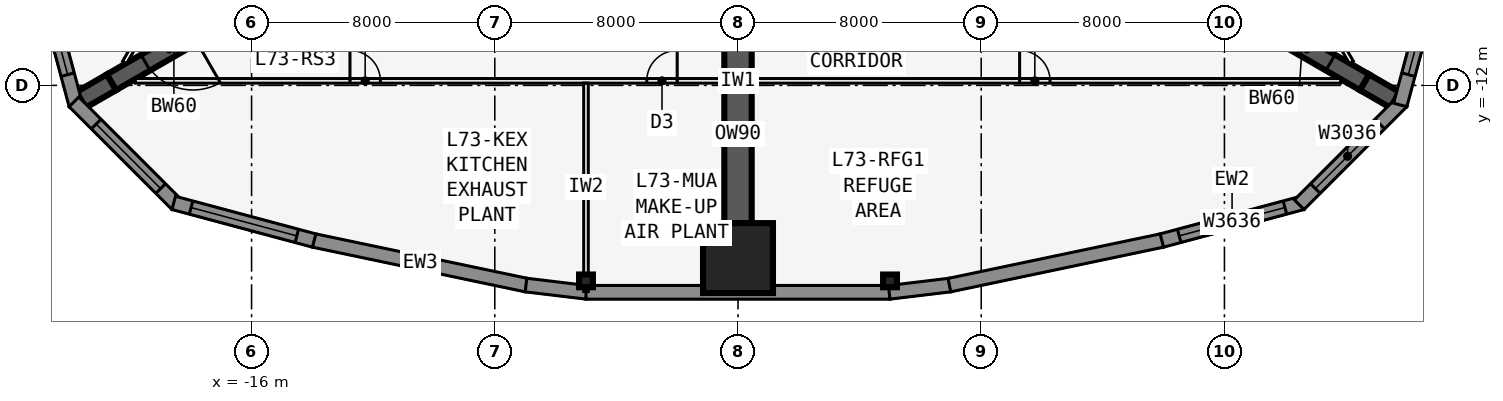
"""IFC4 building model, lengths in metres.
Left out: names, types, materials, properties, quantities, classifications, styles, units other than length and angle.
Written with IfcOpenShell. Run it as: python <this file> out.ifc"""

import sys

from ifc_helpers import new_model, si_unit, direction, frame, frame_2d, origin, origin_2d, place, context, subcontext, project, spatial, polyline, rectangle, i_section, outline, extrude, element, fill, save


model = new_model("IFC4")
c1 = context("Model", 3, precision=1e-05, world=origin(), true_north=direction((0.0, 1.0)))
c2 = subcontext(c1, "Body", "Model", "MODEL_VIEW")
j1 = project(units=[si_unit("LENGTHUNIT", "METRE"), si_unit("PLANEANGLEUNIT", "RADIAN")], contexts=[c1])
p1 = place(None, origin())
s1 = spatial("IfcSite", under=j1, at=p1, CompositionType="ELEMENT")
p2 = place(p1, origin())
s2 = spatial("IfcBuilding", under=s1, at=p2, CompositionType="ELEMENT")
p3 = place(p2, frame((0.0, 0.0, 275.3)))
s3 = spatial("IfcBuildingStorey", under=s2, at=p3, CompositionType="ELEMENT", Elevation=275.3)
p4 = place(p3, frame((16.5, -9.526, 0.0), z_axis=(0.0, 0.0, 1.0), x_axis=(0.866031398331, -0.499989616998, 0.0)))
e1 = element("IfcWall", 1, at=p4, inside=s3, PredefinedType="SHEAR", context=c2, shape_type="SweptSolid", body=[
    extrude(rectangle(XDim=4.746, YDim=0.6, at=frame_2d((2.373, 0.0))), origin(), (0.0, 0.0, 1.0), 6.0),
])
p5 = place(p4, frame((1.65, 0.0, 0.0)))
e2 = element("IfcOpeningElement", 2, at=p5, cuts=e1, PredefinedType="OPENING", context=c2, shape_type="SweptSolid", body=[
    extrude(rectangle(XDim=1.8, YDim=2.13, at=frame_2d((0.9, 1.065))), frame((0.0, 0.31, 0.0), z_axis=(0.0, -1.0, 0.0), x_axis=(1.0, 0.0, 0.0)), (0.0, 0.0, 1.0), 0.62),
])
p6 = place(p3, frame((20.61, -11.899, 0.0), z_axis=(0.0, 0.0, 1.0), x_axis=(0.866009537788, -0.500027479704, 0.0)))
e3 = element("IfcWall", 3, at=p6, inside=s3, PredefinedType="SHEAR", context=c2, shape_type="SweptSolid", body=[
    extrude(rectangle(XDim=1.155, YDim=0.6, at=frame_2d((0.577, 0.0))), origin(), (0.0, 0.0, 1.0), 6.0),
])
p7 = place(p3, frame((-16.5, -9.526, 0.0), z_axis=(0.0, 0.0, 1.0), x_axis=(-0.866031398331, -0.499989616998, 0.0)))
e4 = element("IfcWall", 4, at=p7, inside=s3, PredefinedType="SHEAR", context=c2, shape_type="SweptSolid", body=[
    extrude(rectangle(XDim=4.746, YDim=0.6, at=frame_2d((2.373, 0.0))), origin(), (0.0, 0.0, 1.0), 6.0),
])
p8 = place(p7, frame((1.65, 0.0, 0.0)))
e5 = element("IfcOpeningElement", 5, at=p8, cuts=e4, PredefinedType="OPENING", context=c2, shape_type="SweptSolid", body=[
    extrude(rectangle(XDim=1.8, YDim=2.13, at=frame_2d((0.9, 1.065))), frame((0.0, 0.31, 0.0), z_axis=(0.0, -1.0, 0.0), x_axis=(1.0, 0.0, 0.0)), (0.0, 0.0, 1.0), 0.62),
])
p9 = place(p3, frame((-20.61, -11.899, 0.0), z_axis=(0.0, 0.0, 1.0), x_axis=(-0.866009537788, -0.500027479704, 0.0)))
e6 = element("IfcWall", 6, at=p9, inside=s3, PredefinedType="SHEAR", context=c2, shape_type="SweptSolid", body=[
    extrude(rectangle(XDim=1.155, YDim=0.6, at=frame_2d((0.577, 0.0))), origin(), (0.0, 0.0, 1.0), 6.0),
])
p10 = place(p3, frame((0.0, -9.526, 0.0), z_axis=(0.0, 0.0, 1.0), x_axis=(0.0, -1.0, 0.0)))
e7 = element("IfcWall", 7, at=p10, inside=s3, PredefinedType="SHEAR", context=c2, shape_type="SweptSolid", body=[
    extrude(rectangle(XDim=8.154, YDim=0.9, at=frame_2d((4.077, 0.0))), origin(), (0.0, 0.0, 1.0), 6.0),
])
for number, where, z_axis, x_axis in (
    (8, (-5.0, -18.43, 0.0), (0.0, 0.0, 1.0), (0.0, -1.0, 0.0)),
    (9, (5.0, -18.43, 0.0), (0.0, 0.0, 1.0), (0.0, -1.0, 0.0)),
):
    element("IfcColumn", number, at=place(p3, frame(where, z_axis=z_axis, x_axis=x_axis)), inside=s3, PredefinedType="COLUMN", context=c2, shape_type="SweptSolid", body=[
        extrude(i_section(OverallWidth=0.419, OverallDepth=0.455, WebThickness=0.042, FlangeThickness=0.068, at=origin_2d()), origin(), (0.0, 0.0, 1.0), 6.0),
    ])
p11 = place(p3, frame((0.0, -17.68, 0.0), z_axis=(0.0, 0.0, 1.0), x_axis=(0.0, -1.0, 0.0)))
e10 = element("IfcColumn", 10, at=p11, inside=s3, PredefinedType="COLUMN", context=c2, shape_type="SweptSolid", body=[
    extrude(rectangle(XDim=2.3, YDim=2.3, at=origin_2d()), origin(), (0.0, 0.0, 1.0), 6.0),
])
p12 = place(p3, frame((-13.954, -17.1, 0.0), z_axis=(0.0, 0.0, 1.0), x_axis=(0.978654320409, -0.205513311355, 0.0)))
e11 = element("IfcWall", 11, at=p12, inside=s3, PredefinedType="SOLIDWALL", context=c2, shape_type="SweptSolid", body=[
    extrude(outline(polyline([(0.0, 0.0), (7.153, 0.0), (7.153, 5.75), (0.0, 5.75), (0.0, 0.0)]), holes=[polyline([(5.826, 2.875), (5.75, 3.457), (5.525, 4.0), (5.167, 4.466), (4.701, 4.823), (4.159, 5.048), (3.576, 5.125), (2.994, 5.048), (2.451, 4.823), (1.985, 4.466), (1.628, 4.0), (1.403, 3.457), (1.326, 2.875), (1.403, 2.293), (1.628, 1.75), (1.985, 1.284), (2.451, 0.926), (2.994, 0.702), (3.576, 0.625), (4.159, 0.702), (4.701, 0.926), (5.167, 1.284), (5.525, 1.75), (5.75, 2.293), (5.826, 2.875)])]), frame((0.0, 0.225, 0.0), z_axis=(0.0, -1.0, 0.0), x_axis=(1.0, 0.0, 0.0)), (0.0, 0.0, 1.0), 0.45),
])
p13 = place(p3, frame((-6.973, -18.567, 0.0), z_axis=(0.0, 0.0, 1.0), x_axis=(0.992877411981, -0.119140441403, 0.0)))
e12 = element("IfcWall", 12, at=p13, inside=s3, PredefinedType="SOLIDWALL", context=c2, shape_type="SweptSolid", body=[
    extrude(rectangle(XDim=2.014, YDim=0.45, at=frame_2d((1.007, 0.0))), origin(), (0.0, 0.0, 1.0), 5.75),
])
p14 = place(p3, frame((-5.0, -18.805, 0.0), z_axis=(0.0, 0.0, 1.0), x_axis=(1.0, 0.0, 0.0)))
e13 = element("IfcWall", 13, at=p14, inside=s3, PredefinedType="SOLIDWALL", context=c2, shape_type="SweptSolid", body=[
    extrude(outline(polyline([(0.0, 0.0), (10.0, 0.0), (10.0, 5.75), (0.0, 5.75), (0.0, 0.0)]), holes=[polyline([(7.25, 2.875), (7.173, 3.457), (6.948, 4.0), (6.591, 4.466), (6.125, 4.823), (5.582, 5.048), (5.0, 5.125), (4.418, 5.048), (3.875, 4.823), (3.409, 4.466), (3.052, 4.0), (2.827, 3.457), (2.75, 2.875), (2.827, 2.293), (3.052, 1.75), (3.409, 1.284), (3.875, 0.926), (4.418, 0.702), (5.0, 0.625), (5.582, 0.702), (6.125, 0.926), (6.591, 1.284), (6.948, 1.75), (7.173, 2.293), (7.25, 2.875)])]), frame((0.0, 0.225, 0.0), z_axis=(0.0, -1.0, 0.0), x_axis=(1.0, 0.0, 0.0)), (0.0, 0.0, 1.0), 0.45),
])
p15 = place(p3, frame((4.973, -18.807, 0.0), z_axis=(0.0, 0.0, 1.0), x_axis=(0.992877411981, 0.119140441403, 0.0)))
e14 = element("IfcWall", 14, at=p15, inside=s3, PredefinedType="SOLIDWALL", context=c2, shape_type="SweptSolid", body=[
    extrude(rectangle(XDim=2.014, YDim=0.45, at=frame_2d((1.007, 0.0))), origin(), (0.0, 0.0, 1.0), 5.75),
])
p16 = place(p3, frame((6.954, -18.57, 0.0), z_axis=(0.0, 0.0, 1.0), x_axis=(0.978654320409, 0.205513311355, 0.0)))
e15 = element("IfcWall", 15, at=p16, inside=s3, PredefinedType="SOLIDWALL", context=c2, shape_type="SweptSolid", body=[
    extrude(outline(polyline([(0.0, 0.0), (7.153, 0.0), (7.153, 5.75), (0.0, 5.75), (0.0, 0.0)]), holes=[polyline([(5.826, 2.875), (5.75, 3.457), (5.525, 4.0), (5.167, 4.466), (4.701, 4.823), (4.159, 5.048), (3.576, 5.125), (2.994, 5.048), (2.451, 4.823), (1.985, 4.466), (1.628, 4.0), (1.403, 3.457), (1.326, 2.875), (1.403, 2.293), (1.628, 1.75), (1.985, 1.284), (2.451, 0.926), (2.994, 0.702), (3.576, 0.625), (4.159, 0.702), (4.701, 0.926), (5.167, 1.284), (5.525, 1.75), (5.75, 2.293), (5.826, 2.875)])]), frame((0.0, 0.225, 0.0), z_axis=(0.0, -1.0, 0.0), x_axis=(1.0, 0.0, 0.0)), (0.0, 0.0, 1.0), 0.45),
])
p17 = place(p3, frame((13.942, -17.103, 0.0), z_axis=(0.0, 0.0, 1.0), x_axis=(0.965913862671, 0.258863689806, 0.0)))
e16 = element("IfcWall", 16, at=p17, inside=s3, PredefinedType="SOLIDWALL", context=c2, shape_type="SweptSolid", body=[
    extrude(rectangle(XDim=4.782, YDim=0.45, at=frame_2d((2.391, 0.0))), origin(), (0.0, 0.0, 1.0), 5.75),
])
p18 = place(p17, frame((0.591, 0.0, 0.9)))
e17 = element("IfcOpeningElement", 17, at=p18, cuts=e16, PredefinedType="OPENING", context=c2, shape_type="SweptSolid", body=[
    extrude(rectangle(XDim=3.6, YDim=3.6, at=frame_2d((1.8, 1.8))), frame((0.0, 0.235, 0.0), z_axis=(0.0, -1.0, 0.0), x_axis=(1.0, 0.0, 0.0)), (0.0, 0.0, 1.0), 0.47),
])
p19 = place(p3, frame((18.46, -15.924, 0.0), z_axis=(0.0, 0.0, 1.0), x_axis=(0.707081252484, 0.707132308968, 0.0)))
e18 = element("IfcWall", 18, at=p19, inside=s3, PredefinedType="SOLIDWALL", context=c2, shape_type="SweptSolid", body=[
    extrude(outline(polyline([(4.782, 0.225), (4.723, 0.225), (4.375, 0.132), (4.351, 0.225), (0.0, 0.225), (0.0, -0.225), (4.782, -0.225), (4.782, 0.225)])), origin(), (0.0, 0.0, 1.0), 5.75),
])
p20 = place(p19, frame((0.75, 0.0, 0.9)))
e19 = element("IfcOpeningElement", 19, at=p20, cuts=e18, PredefinedType="OPENING", context=c2, shape_type="SweptSolid", body=[
    extrude(rectangle(XDim=3.0, YDim=3.6, at=frame_2d((1.5, 1.8))), frame((0.0, 0.235, 0.0), z_axis=(0.0, -1.0, 0.0), x_axis=(1.0, 0.0, 0.0)), (0.0, 0.0, 1.0), 0.47),
])
p21 = place(p3, frame((21.783, -12.644, 0.0), z_axis=(0.0, 0.0, 1.0), x_axis=(0.25880328844, 0.965930048136, 0.0)))
e20 = element("IfcWall", 20, at=p21, inside=s3, PredefinedType="SOLIDWALL", context=c2, shape_type="SweptSolid", body=[
    extrude(outline(polyline([(4.782, 0.225), (0.431, 0.225), (0.406, 0.132), (0.06, 0.225), (0.0, 0.225), (0.0, -0.225), (4.782, -0.225), (4.782, 0.225)])), origin(), (0.0, 0.0, 1.0), 5.75),
])
p22 = place(p21, frame((1.031, 0.0, 0.9)))
e21 = element("IfcOpeningElement", 21, at=p22, cuts=e20, PredefinedType="OPENING", context=c2, shape_type="SweptSolid", body=[
    extrude(rectangle(XDim=3.0, YDim=3.6, at=frame_2d((1.5, 1.8))), frame((0.0, 0.235, 0.0), z_axis=(0.0, -1.0, 0.0), x_axis=(1.0, 0.0, 0.0)), (0.0, 0.0, 1.0), 0.47),
])
p23 = place(p3, frame((-23.02, -8.025, 0.0), z_axis=(0.0, 0.0, 1.0), x_axis=(0.25880328844, -0.965930048136, 0.0)))
e22 = element("IfcWall", 22, at=p23, inside=s3, PredefinedType="SOLIDWALL", context=c2, shape_type="SweptSolid", body=[
    extrude(outline(polyline([(4.782, 0.225), (4.722, 0.225), (4.375, 0.132), (4.351, 0.225), (0.0, 0.225), (0.0, -0.225), (4.782, -0.225), (4.782, 0.225)])), origin(), (0.0, 0.0, 1.0), 5.75),
])
p24 = place(p23, frame((0.75, 0.0, 0.9)))
e23 = element("IfcOpeningElement", 23, at=p24, cuts=e22, PredefinedType="OPENING", context=c2, shape_type="SweptSolid", body=[
    extrude(rectangle(XDim=3.0, YDim=3.6, at=frame_2d((1.5, 1.8))), frame((0.0, 0.235, 0.0), z_axis=(0.0, -1.0, 0.0), x_axis=(1.0, 0.0, 0.0)), (0.0, 0.0, 1.0), 0.47),
])
p25 = place(p3, frame((-21.841, -12.542, 0.0), z_axis=(0.0, 0.0, 1.0), x_axis=(0.707081252484, -0.707132308968, 0.0)))
e24 = element("IfcWall", 24, at=p25, inside=s3, PredefinedType="SOLIDWALL", context=c2, shape_type="SweptSolid", body=[
    extrude(outline(polyline([(4.782, 0.225), (0.431, 0.225), (0.406, 0.132), (0.059, 0.225), (0.0, 0.225), (0.0, -0.225), (4.782, -0.225), (4.782, 0.225)])), origin(), (0.0, 0.0, 1.0), 5.75),
])
p26 = place(p25, frame((1.031, 0.0, 0.9)))
e25 = element("IfcOpeningElement", 25, at=p26, cuts=e24, PredefinedType="OPENING", context=c2, shape_type="SweptSolid", body=[
    extrude(rectangle(XDim=3.0, YDim=3.6, at=frame_2d((1.5, 1.8))), frame((0.0, 0.235, 0.0), z_axis=(0.0, -1.0, 0.0), x_axis=(1.0, 0.0, 0.0)), (0.0, 0.0, 1.0), 0.47),
])
p27 = place(p3, frame((-18.561, -15.865, 0.0), z_axis=(0.0, 0.0, 1.0), x_axis=(0.965913862671, -0.258863689806, 0.0)))
e26 = element("IfcWall", 26, at=p27, inside=s3, PredefinedType="SOLIDWALL", context=c2, shape_type="SweptSolid", body=[
    extrude(rectangle(XDim=4.782, YDim=0.45, at=frame_2d((2.391, 0.0))), origin(), (0.0, 0.0, 1.0), 5.75),
])
p28 = place(p27, frame((0.591, 0.0, 0.9)))
e27 = element("IfcOpeningElement", 27, at=p28, cuts=e26, PredefinedType="OPENING", context=c2, shape_type="SweptSolid", body=[
    extrude(rectangle(XDim=3.6, YDim=3.6, at=frame_2d((1.8, 1.8))), frame((0.0, 0.235, 0.0), z_axis=(0.0, -1.0, 0.0), x_axis=(1.0, 0.0, 0.0)), (0.0, 0.0, 1.0), 0.47),
])
p29 = place(p3, frame((-19.827, -11.851, 0.0), z_axis=(0.0, 0.0, 1.0), x_axis=(1.0, 0.0, 0.0)))
e28 = element("IfcWall", 28, at=p29, inside=s3, PredefinedType="PARTITIONING", context=c2, shape_type="SweptSolid", body=[
    extrude(rectangle(XDim=39.654, YDim=0.15, at=frame_2d((19.827, 0.0))), origin(), (0.0, 0.0, 1.0), 5.75),
])
p30 = place(p29, frame((7.063, 0.0, 0.0)))
e29 = element("IfcOpeningElement", 29, at=p30, cuts=e28, PredefinedType="OPENING", context=c2, shape_type="SweptSolid", body=[
    extrude(rectangle(XDim=1.0, YDim=2.13, at=frame_2d((0.5, 1.065))), frame((0.0, 0.085, 0.0), z_axis=(0.0, -1.0, 0.0), x_axis=(1.0, 0.0, 0.0)), (0.0, 0.0, 1.0), 0.17),
])
p31 = place(p29, frame((16.827, 0.0, 0.0)))
e30 = element("IfcOpeningElement", 30, at=p31, cuts=e28, PredefinedType="OPENING", context=c2, shape_type="SweptSolid", body=[
    extrude(rectangle(XDim=1.0, YDim=2.13, at=frame_2d((0.5, 1.065))), frame((0.0, 0.085, 0.0), z_axis=(0.0, -1.0, 0.0), x_axis=(1.0, 0.0, 0.0)), (0.0, 0.0, 1.0), 0.17),
])
p32 = place(p29, frame((29.091, 0.0, 0.0)))
e31 = element("IfcOpeningElement", 31, at=p32, cuts=e28, PredefinedType="OPENING", context=c2, shape_type="SweptSolid", body=[
    extrude(rectangle(XDim=1.0, YDim=2.13, at=frame_2d((0.5, 1.065))), frame((0.0, 0.085, 0.0), z_axis=(0.0, -1.0, 0.0), x_axis=(1.0, 0.0, 0.0)), (0.0, 0.0, 1.0), 0.17),
])
p33 = place(p3, frame((-5.0, -11.926, 0.0), z_axis=(0.0, 0.0, 1.0), x_axis=(0.0, -1.0, 0.0)))
e32 = element("IfcWall", 32, at=p33, inside=s3, PredefinedType="PARTITIONING", context=c2, shape_type="SweptSolid", body=[
    extrude(rectangle(XDim=6.853, YDim=0.15, at=frame_2d((3.426, 0.0))), origin(), (0.0, 0.0, 1.0), 4.35),
])
p34 = place(p3, frame((20.177, -11.245, 0.0), z_axis=(0.0, 0.0, 1.0), x_axis=(-0.499998875317, 0.866026053119, 0.0)))
e33 = element("IfcWall", 33, at=p34, inside=s3, PredefinedType="PARTITIONING", context=c2, shape_type="SweptSolid", body=[
    extrude(rectangle(XDim=39.654, YDim=0.15, at=frame_2d((19.827, 0.0))), origin(), (0.0, 0.0, 1.0), 5.75),
])
p35 = place(p34, frame((6.563, 0.0, 0.0)))
e34 = element("IfcOpeningElement", 34, at=p35, cuts=e33, PredefinedType="OPENING", context=c2, shape_type="SweptSolid", body=[
    extrude(rectangle(XDim=1.0, YDim=2.13, at=frame_2d((0.5, 1.065))), frame((0.0, 0.085, 0.0), z_axis=(0.0, -1.0, 0.0), x_axis=(1.0, 0.0, 0.0)), (0.0, 0.0, 1.0), 0.17),
])
p36 = place(p34, frame((16.327, 0.0, 0.0)))
e35 = element("IfcOpeningElement", 35, at=p36, cuts=e33, PredefinedType="OPENING", context=c2, shape_type="SweptSolid", body=[
    extrude(rectangle(XDim=1.0, YDim=2.13, at=frame_2d((0.5, 1.065))), frame((0.0, 0.085, 0.0), z_axis=(0.0, -1.0, 0.0), x_axis=(1.0, 0.0, 0.0)), (0.0, 0.0, 1.0), 0.17),
])
p37 = place(p34, frame((29.091, 0.0, 0.0)))
e36 = element("IfcOpeningElement", 36, at=p37, cuts=e33, PredefinedType="OPENING", context=c2, shape_type="SweptSolid", body=[
    extrude(rectangle(XDim=1.0, YDim=2.13, at=frame_2d((0.5, 1.065))), frame((0.0, 0.085, 0.0), z_axis=(0.0, -1.0, 0.0), x_axis=(1.0, 0.0, 0.0)), (0.0, 0.0, 1.0), 0.17),
])
p38 = place(p3, frame((-0.35, 23.096, 0.0), z_axis=(0.0, 0.0, 1.0), x_axis=(-0.499998875317, -0.866026053119, 0.0)))
e37 = element("IfcWall", 37, at=p38, inside=s3, PredefinedType="PARTITIONING", context=c2, shape_type="SweptSolid", body=[
    extrude(rectangle(XDim=39.654, YDim=0.15, at=frame_2d((19.827, 0.0))), origin(), (0.0, 0.0, 1.0), 5.75),
])
p39 = place(p38, frame((9.563, 0.0, 0.0)))
e38 = element("IfcOpeningElement", 38, at=p39, cuts=e37, PredefinedType="OPENING", context=c2, shape_type="SweptSolid", body=[
    extrude(rectangle(XDim=1.0, YDim=2.13, at=frame_2d((0.5, 1.065))), frame((0.0, 0.085, 0.0), z_axis=(0.0, -1.0, 0.0), x_axis=(1.0, 0.0, 0.0)), (0.0, 0.0, 1.0), 0.17),
])
p40 = place(p38, frame((22.327, 0.0, 0.0)))
e39 = element("IfcOpeningElement", 39, at=p40, cuts=e37, PredefinedType="OPENING", context=c2, shape_type="SweptSolid", body=[
    extrude(rectangle(XDim=1.0, YDim=2.13, at=frame_2d((0.5, 1.065))), frame((0.0, 0.085, 0.0), z_axis=(0.0, -1.0, 0.0), x_axis=(1.0, 0.0, 0.0)), (0.0, 0.0, 1.0), 0.17),
])
p41 = place(p38, frame((32.091, 0.0, 0.0)))
e40 = element("IfcOpeningElement", 40, at=p41, cuts=e37, PredefinedType="OPENING", context=c2, shape_type="SweptSolid", body=[
    extrude(rectangle(XDim=1.0, YDim=2.13, at=frame_2d((0.5, 1.065))), frame((0.0, 0.085, 0.0), z_axis=(0.0, -1.0, 0.0), x_axis=(1.0, 0.0, 0.0)), (0.0, 0.0, 1.0), 0.17),
])
p42 = place(p18, origin())
e41 = element("IfcWindow", 41, at=p42, inside=s3, PartitioningType="SINGLE_PANEL", PredefinedType="WINDOW", context=c2, shape_type="SweptSolid", body=[
    extrude(rectangle(XDim=3.6, YDim=3.6, at=frame_2d((1.8, 1.8))), frame((0.0, 0.03, 0.0), z_axis=(0.0, -1.0, 0.0), x_axis=(1.0, 0.0, 0.0)), (0.0, 0.0, 1.0), 0.06),
])
fill(e17, e41)
p43 = place(p20, origin())
e42 = element("IfcWindow", 42, at=p43, inside=s3, PartitioningType="SINGLE_PANEL", PredefinedType="WINDOW", context=c2, shape_type="SweptSolid", body=[
    extrude(rectangle(XDim=3.0, YDim=3.6, at=frame_2d((1.5, 1.8))), frame((0.0, 0.03, 0.0), z_axis=(0.0, -1.0, 0.0), x_axis=(1.0, 0.0, 0.0)), (0.0, 0.0, 1.0), 0.06),
])
fill(e19, e42)
p44 = place(p22, origin())
e43 = element("IfcWindow", 43, at=p44, inside=s3, PartitioningType="SINGLE_PANEL", PredefinedType="WINDOW", context=c2, shape_type="SweptSolid", body=[
    extrude(rectangle(XDim=3.0, YDim=3.6, at=frame_2d((1.5, 1.8))), frame((0.0, 0.03, 0.0), z_axis=(0.0, -1.0, 0.0), x_axis=(1.0, 0.0, 0.0)), (0.0, 0.0, 1.0), 0.06),
])
fill(e21, e43)
p45 = place(p24, origin())
e44 = element("IfcWindow", 44, at=p45, inside=s3, PartitioningType="SINGLE_PANEL", PredefinedType="WINDOW", context=c2, shape_type="SweptSolid", body=[
    extrude(rectangle(XDim=3.0, YDim=3.6, at=frame_2d((1.5, 1.8))), frame((0.0, 0.03, 0.0), z_axis=(0.0, -1.0, 0.0), x_axis=(1.0, 0.0, 0.0)), (0.0, 0.0, 1.0), 0.06),
])
fill(e23, e44)
p46 = place(p26, origin())
e45 = element("IfcWindow", 45, at=p46, inside=s3, PartitioningType="SINGLE_PANEL", PredefinedType="WINDOW", context=c2, shape_type="SweptSolid", body=[
    extrude(rectangle(XDim=3.0, YDim=3.6, at=frame_2d((1.5, 1.8))), frame((0.0, 0.03, 0.0), z_axis=(0.0, -1.0, 0.0), x_axis=(1.0, 0.0, 0.0)), (0.0, 0.0, 1.0), 0.06),
])
fill(e25, e45)
p47 = place(p28, origin())
e46 = element("IfcWindow", 46, at=p47, inside=s3, PartitioningType="SINGLE_PANEL", PredefinedType="WINDOW", context=c2, shape_type="SweptSolid", body=[
    extrude(rectangle(XDim=3.6, YDim=3.6, at=frame_2d((1.8, 1.8))), frame((0.0, 0.03, 0.0), z_axis=(0.0, -1.0, 0.0), x_axis=(1.0, 0.0, 0.0)), (0.0, 0.0, 1.0), 0.06),
])
fill(e27, e46)
p48 = place(p30, origin())
e47 = element("IfcDoor", 47, at=p48, inside=s3, OperationType="SINGLE_SWING_LEFT", PredefinedType="DOOR", context=c2, shape_type="SweptSolid", body=[
    extrude(rectangle(XDim=1.0, YDim=2.13, at=frame_2d((0.5, 1.065))), frame((0.0, 0.025, 0.0), z_axis=(0.0, -1.0, 0.0), x_axis=(1.0, 0.0, 0.0)), (0.0, 0.0, 1.0), 0.05),
])
fill(e29, e47)
p49 = place(p31, origin())
e48 = element("IfcDoor", 48, at=p49, inside=s3, OperationType="SINGLE_SWING_RIGHT", PredefinedType="DOOR", context=c2, shape_type="SweptSolid", body=[
    extrude(rectangle(XDim=1.0, YDim=2.13, at=frame_2d((0.5, 1.065))), frame((0.0, 0.025, 0.0), z_axis=(0.0, -1.0, 0.0), x_axis=(1.0, 0.0, 0.0)), (0.0, 0.0, 1.0), 0.05),
])
fill(e30, e48)
p50 = place(p32, origin())
e49 = element("IfcDoor", 49, at=p50, inside=s3, OperationType="SINGLE_SWING_LEFT", PredefinedType="DOOR", context=c2, shape_type="SweptSolid", body=[
    extrude(rectangle(XDim=1.0, YDim=2.13, at=frame_2d((0.5, 1.065))), frame((0.0, 0.025, 0.0), z_axis=(0.0, -1.0, 0.0), x_axis=(1.0, 0.0, 0.0)), (0.0, 0.0, 1.0), 0.05),
])
fill(e31, e49)
p51 = place(p5, origin())
e50 = element("IfcDoor", 50, at=p51, inside=s3, OperationType="DOUBLE_DOOR_DOUBLE_SWING", PredefinedType="DOOR", context=c2, shape_type="SweptSolid", body=[
    extrude(rectangle(XDim=1.8, YDim=2.13, at=frame_2d((0.9, 1.065))), frame((0.0, 0.025, 0.0), z_axis=(0.0, -1.0, 0.0), x_axis=(1.0, 0.0, 0.0)), (0.0, 0.0, 1.0), 0.05),
])
fill(e2, e50)
p52 = place(p8, origin())
e51 = element("IfcDoor", 51, at=p52, inside=s3, OperationType="DOUBLE_DOOR_DOUBLE_SWING", PredefinedType="DOOR", context=c2, shape_type="SweptSolid", body=[
    extrude(rectangle(XDim=1.8, YDim=2.13, at=frame_2d((0.9, 1.065))), frame((0.0, 0.025, 0.0), z_axis=(0.0, -1.0, 0.0), x_axis=(1.0, 0.0, 0.0)), (0.0, 0.0, 1.0), 0.05),
])
fill(e5, e51)
save(model, sys.argv[1])
